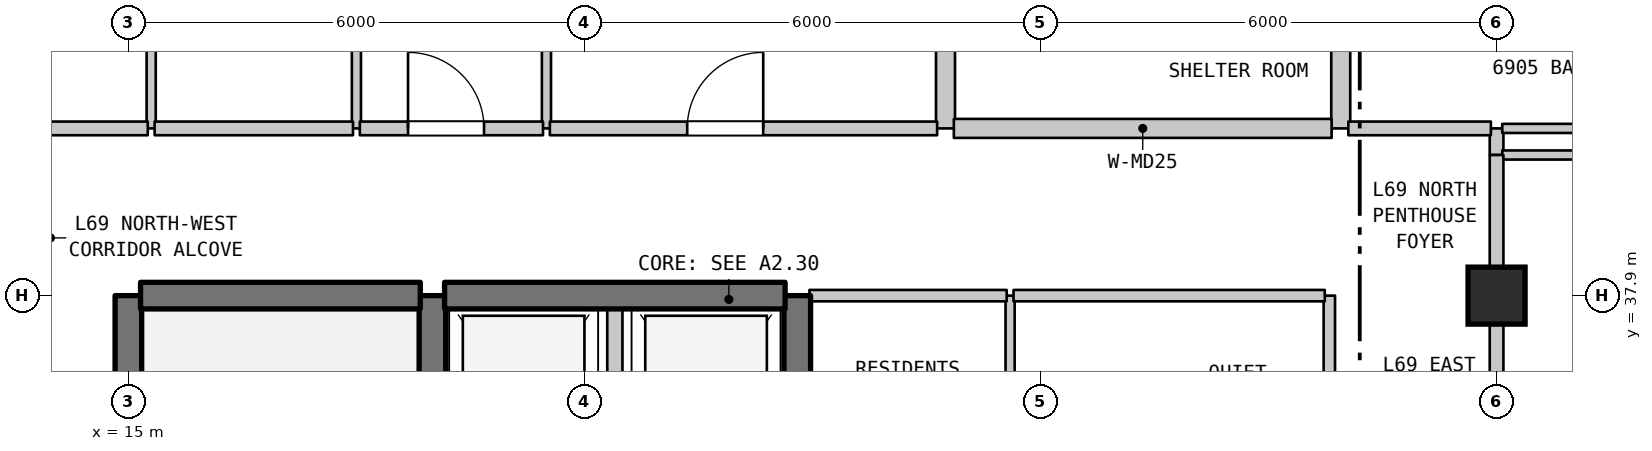
"""IFC4 building model, lengths in metres.
Left out: names, types, materials, properties, quantities, classifications, styles, units other than length and angle.
Written with IfcOpenShell. Run it as: python <this file> out.ifc"""

import sys

from ifc_helpers import new_model, si_unit, direction, frame, frame_2d, origin, origin_2d, place, context, subcontext, project, spatial, rectangle, extrude, element, fill, save


model = new_model("IFC4")
c1 = context("Model", 3, precision=1e-05, world=origin(), true_north=direction((0.0, 1.0)))
c2 = subcontext(c1, "Body", "Model", "MODEL_VIEW")
j1 = project(units=[si_unit("LENGTHUNIT", "METRE"), si_unit("PLANEANGLEUNIT", "RADIAN")], contexts=[c1])
p1 = place(None, origin())
s1 = spatial("IfcSite", under=j1, at=p1, CompositionType="ELEMENT")
p2 = place(p1, origin())
s2 = spatial("IfcBuilding", under=s1, at=p2, CompositionType="ELEMENT")
p3 = place(p2, frame((0.0, 0.0, 276.9)))
s3 = spatial("IfcBuildingStorey", under=s2, at=p3, CompositionType="ELEMENT", Elevation=276.9)
p4 = place(p3, frame((33.0, 37.9, 0.0), z_axis=(0.0, 0.0, 1.0), x_axis=(1.0, 0.0, 0.0)))
e1 = element("IfcColumn", 1, at=p4, inside=s3, PredefinedType="COLUMN", context=c2, shape_type="SweptSolid", body=[
    extrude(rectangle(XDim=0.75, YDim=0.75, at=origin_2d()), origin(), (0.0, 0.0, 1.0), 3.7),
])
p5 = place(p3, frame((15.0, 31.1, 0.0), z_axis=(0.0, 0.0, 1.0), x_axis=(0.0, 1.0, 0.0)))
e2 = element("IfcWall", 2, at=p5, inside=s3, PredefinedType="SHEAR", context=c2, shape_type="SweptSolid", body=[
    extrude(rectangle(XDim=6.8, YDim=0.35, at=frame_2d((3.4, 0.0))), origin(), (0.0, 0.0, 1.0), 3.39),
])
p6 = place(p3, frame((15.3, 40.1, 0.0), z_axis=(0.0, 0.0, 1.0), x_axis=(0.0, 1.0, 0.0)))
e3 = element("IfcWall", 3, at=p6, inside=s3, PredefinedType="PARTITIONING", context=c2, shape_type="SweptSolid", body=[
    extrude(rectangle(XDim=3.2, YDim=0.12, at=frame_2d((1.6, 0.0))), origin(), (0.0, 0.0, 1.0), 3.39),
])
p7 = place(p3, frame((18.0, 40.1, 0.0), z_axis=(0.0, 0.0, 1.0), x_axis=(0.0, 1.0, 0.0)))
e4 = element("IfcWall", 4, at=p7, inside=s3, PredefinedType="PARTITIONING", context=c2, shape_type="SweptSolid", body=[
    extrude(rectangle(XDim=3.2, YDim=0.12, at=frame_2d((1.6, 0.0))), origin(), (0.0, 0.0, 1.0), 3.39),
])
p8 = place(p7, frame((1.15, 0.0, 0.0)))
e5 = element("IfcOpeningElement", 5, at=p8, cuts=e4, PredefinedType="OPENING", context=c2, shape_type="SweptSolid", body=[
    extrude(rectangle(XDim=0.9, YDim=2.15, at=frame_2d((0.45, 1.075))), frame((0.0, 0.07, 0.0), z_axis=(0.0, -1.0, 0.0), x_axis=(1.0, 0.0, 0.0)), (0.0, 0.0, 1.0), 0.14),
])
p9 = place(p3, frame((19.0, 35.0, 0.0), z_axis=(0.0, 0.0, 1.0), x_axis=(0.0, 1.0, 0.0)))
e6 = element("IfcWall", 6, at=p9, inside=s3, PredefinedType="SHEAR", context=c2, shape_type="SweptSolid", body=[
    extrude(rectangle(XDim=2.9, YDim=0.35, at=frame_2d((1.45, 0.0))), origin(), (0.0, 0.0, 1.0), 3.39),
])
p10 = place(p3, frame((20.5, 40.1, 0.0), z_axis=(0.0, 0.0, 1.0), x_axis=(0.0, 1.0, 0.0)))
e7 = element("IfcWall", 7, at=p10, inside=s3, PredefinedType="PARTITIONING", context=c2, shape_type="SweptSolid", body=[
    extrude(rectangle(XDim=2.05, YDim=0.12, at=frame_2d((1.025, 0.0))), origin(), (0.0, 0.0, 1.0), 3.39),
])
p11 = place(p3, frame((21.4, 35.0, 0.0), z_axis=(0.0, 0.0, 1.0), x_axis=(0.0, 1.0, 0.0)))
e8 = element("IfcWall", 8, at=p11, inside=s3, PredefinedType="STANDARD", context=c2, shape_type="SweptSolid", body=[
    extrude(rectangle(XDim=2.9, YDim=0.2, at=frame_2d((1.45, 0.0))), origin(), (0.0, 0.0, 1.0), 3.39),
])
p12 = place(p3, frame((23.8, 35.0, 0.0), z_axis=(0.0, 0.0, 1.0), x_axis=(0.0, 1.0, 0.0)))
e9 = element("IfcWall", 9, at=p12, inside=s3, PredefinedType="SHEAR", context=c2, shape_type="SweptSolid", body=[
    extrude(rectangle(XDim=2.9, YDim=0.35, at=frame_2d((1.45, 0.0))), origin(), (0.0, 0.0, 1.0), 3.39),
])
p13 = place(p3, frame((25.75, 40.1, 0.0), z_axis=(0.0, 0.0, 1.0), x_axis=(0.0, 1.0, 0.0)))
e10 = element("IfcWall", 10, at=p13, inside=s3, PredefinedType="STANDARD", context=c2, shape_type="SweptSolid", body=[
    extrude(rectangle(XDim=2.3, YDim=0.25, at=frame_2d((1.15, 0.0))), origin(), (0.0, 0.0, 1.0), 3.39),
])
p14 = place(p3, frame((26.6, 35.0, 0.0), z_axis=(0.0, 0.0, 1.0), x_axis=(0.0, 1.0, 0.0)))
e11 = element("IfcWall", 11, at=p14, inside=s3, PredefinedType="PARTITIONING", context=c2, shape_type="SweptSolid", body=[
    extrude(rectangle(XDim=2.9, YDim=0.12, at=frame_2d((1.45, 0.0))), origin(), (0.0, 0.0, 1.0), 3.39),
])
p15 = place(p3, frame((30.8, 35.0, 0.0), z_axis=(0.0, 0.0, 1.0), x_axis=(0.0, 1.0, 0.0)))
e12 = element("IfcWall", 12, at=p15, inside=s3, PredefinedType="STANDARD", context=c2, shape_type="SweptSolid", body=[
    extrude(rectangle(XDim=2.9, YDim=0.15, at=frame_2d((1.45, 0.0))), origin(), (0.0, 0.0, 1.0), 3.39),
])
p16 = place(p3, frame((30.95, 40.1, 0.0), z_axis=(0.0, 0.0, 1.0), x_axis=(0.0, 1.0, 0.0)))
e13 = element("IfcWall", 13, at=p16, inside=s3, PredefinedType="STANDARD", context=c2, shape_type="SweptSolid", body=[
    extrude(rectangle(XDim=2.3, YDim=0.25, at=frame_2d((1.15, 0.0))), origin(), (0.0, 0.0, 1.0), 3.39),
])
p17 = place(p3, frame((33.0, 36.639, 0.0), z_axis=(0.0, 0.0, 1.0), x_axis=(0.0, 1.0, 0.0)))
e14 = element("IfcWall", 14, at=p17, inside=s3, PredefinedType="STANDARD", context=c2, shape_type="SweptSolid", body=[
    extrude(rectangle(XDim=1.261, YDim=0.18, at=frame_2d((0.63, 0.0))), origin(), (0.0, 0.0, 1.0), 2.89),
])
p18 = place(p3, frame((33.0, 39.75, 0.0), z_axis=(0.0, 0.0, 1.0), x_axis=(0.0, 1.0, 0.0)))
e15 = element("IfcWall", 15, at=p18, inside=s3, PredefinedType="STANDARD", context=c2, shape_type="SweptSolid", body=[
    extrude(rectangle(XDim=0.35, YDim=0.18, at=frame_2d((0.175, 0.0))), origin(), (0.0, 0.0, 1.0), 3.39),
])
p19 = place(p3, frame((15.16, 37.9, 0.0), z_axis=(0.0, 0.0, 1.0), x_axis=(1.0, 0.0, 0.0)))
e16 = element("IfcWall", 16, at=p19, inside=s3, PredefinedType="SHEAR", context=c2, shape_type="SweptSolid", body=[
    extrude(rectangle(XDim=3.68, YDim=0.35, at=frame_2d((1.84, 0.0))), origin(), (0.0, 0.0, 1.0), 3.39),
])
p20 = place(p3, frame((19.16, 37.9, 0.0), z_axis=(0.0, 0.0, 1.0), x_axis=(1.0, 0.0, 0.0)))
e17 = element("IfcWall", 17, at=p20, inside=s3, PredefinedType="SHEAR", context=c2, shape_type="SweptSolid", body=[
    extrude(rectangle(XDim=4.48, YDim=0.35, at=frame_2d((2.24, 0.0))), origin(), (0.0, 0.0, 1.0), 3.39),
])
p21 = place(p3, frame((23.96, 37.9, 0.0), z_axis=(0.0, 0.0, 1.0), x_axis=(1.0, 0.0, 0.0)))
e18 = element("IfcWall", 18, at=p21, inside=s3, PredefinedType="STANDARD", context=c2, shape_type="SweptSolid", body=[
    extrude(rectangle(XDim=2.595, YDim=0.15, at=frame_2d((1.297, 0.0))), origin(), (0.0, 0.0, 1.0), 2.89),
])
p22 = place(p3, frame((26.645, 37.9, 0.0), z_axis=(0.0, 0.0, 1.0), x_axis=(1.0, 0.0, 0.0)))
e19 = element("IfcWall", 19, at=p22, inside=s3, PredefinedType="STANDARD", context=c2, shape_type="SweptSolid", body=[
    extrude(rectangle(XDim=4.095, YDim=0.15, at=frame_2d((2.047, 0.0))), origin(), (0.0, 0.0, 1.0), 2.89),
])
p23 = place(p3, frame((33.075, 39.75, 0.0), z_axis=(0.0, 0.0, 1.0), x_axis=(1.0, 0.0, 0.0)))
e20 = element("IfcWall", 20, at=p23, inside=s3, PredefinedType="PARTITIONING", context=c2, shape_type="SweptSolid", body=[
    extrude(rectangle(XDim=4.46, YDim=0.12, at=frame_2d((2.23, 0.0))), origin(), (0.0, 0.0, 1.0), 3.39),
])
p24 = place(p3, frame((12.975, 40.1, 0.0), z_axis=(0.0, 0.0, 1.0), x_axis=(1.0, 0.0, 0.0)))
e21 = element("IfcWall", 21, at=p24, inside=s3, PredefinedType="STANDARD", context=c2, shape_type="SweptSolid", body=[
    extrude(rectangle(XDim=2.28, YDim=0.18, at=frame_2d((1.14, 0.0))), origin(), (0.0, 0.0, 1.0), 3.39),
])
p25 = place(p3, frame((15.345, 40.1, 0.0), z_axis=(0.0, 0.0, 1.0), x_axis=(1.0, 0.0, 0.0)))
e22 = element("IfcWall", 22, at=p25, inside=s3, PredefinedType="STANDARD", context=c2, shape_type="SweptSolid", body=[
    extrude(rectangle(XDim=2.61, YDim=0.18, at=frame_2d((1.305, 0.0))), origin(), (0.0, 0.0, 1.0), 3.39),
])
p26 = place(p3, frame((18.045, 40.1, 0.0), z_axis=(0.0, 0.0, 1.0), x_axis=(1.0, 0.0, 0.0)))
e23 = element("IfcWall", 23, at=p26, inside=s3, PredefinedType="STANDARD", context=c2, shape_type="SweptSolid", body=[
    extrude(rectangle(XDim=2.41, YDim=0.18, at=frame_2d((1.205, 0.0))), origin(), (0.0, 0.0, 1.0), 3.39),
])
p27 = place(p26, frame((0.634, 0.0, 0.0)))
e24 = element("IfcOpeningElement", 24, at=p27, cuts=e23, PredefinedType="OPENING", context=c2, shape_type="SweptSolid", body=[
    extrude(rectangle(XDim=1.0, YDim=2.15, at=frame_2d((0.5, 1.075))), frame((0.0, 0.1, 0.0), z_axis=(0.0, -1.0, 0.0), x_axis=(1.0, 0.0, 0.0)), (0.0, 0.0, 1.0), 0.2),
])
p28 = place(p3, frame((20.545, 40.1, 0.0), z_axis=(0.0, 0.0, 1.0), x_axis=(1.0, 0.0, 0.0)))
e25 = element("IfcWall", 25, at=p28, inside=s3, PredefinedType="STANDARD", context=c2, shape_type="SweptSolid", body=[
    extrude(rectangle(XDim=5.095, YDim=0.18, at=frame_2d((2.547, 0.0))), origin(), (0.0, 0.0, 1.0), 3.39),
])
p29 = place(p28, frame((1.807, 0.0, 0.0)))
e26 = element("IfcOpeningElement", 26, at=p29, cuts=e25, PredefinedType="OPENING", context=c2, shape_type="SweptSolid", body=[
    extrude(rectangle(XDim=1.0, YDim=2.15, at=frame_2d((0.5, 1.075))), frame((0.0, 0.1, 0.0), z_axis=(0.0, -1.0, 0.0), x_axis=(1.0, 0.0, 0.0)), (0.0, 0.0, 1.0), 0.2),
])
p30 = place(p3, frame((25.86, 40.1, 0.0), z_axis=(0.0, 0.0, 1.0), x_axis=(1.0, 0.0, 0.0)))
e27 = element("IfcWall", 27, at=p30, inside=s3, PredefinedType="STANDARD", context=c2, shape_type="SweptSolid", body=[
    extrude(rectangle(XDim=4.97, YDim=0.25, at=frame_2d((2.485, 0.0))), origin(), (0.0, 0.0, 1.0), 3.39),
])
p31 = place(p3, frame((31.05, 40.1, 0.0), z_axis=(0.0, 0.0, 1.0), x_axis=(1.0, 0.0, 0.0)))
e28 = element("IfcWall", 28, at=p31, inside=s3, PredefinedType="STANDARD", context=c2, shape_type="SweptSolid", body=[
    extrude(rectangle(XDim=1.875, YDim=0.18, at=frame_2d((0.938, 0.0))), origin(), (0.0, 0.0, 1.0), 3.39),
])
p32 = place(p3, frame((33.075, 40.1, 0.0), z_axis=(0.0, 0.0, 1.0), x_axis=(1.0, 0.0, 0.0)))
e29 = element("IfcWall", 29, at=p32, inside=s3, PredefinedType="PARTITIONING", context=c2, shape_type="SweptSolid", body=[
    extrude(rectangle(XDim=2.02, YDim=0.12, at=frame_2d((1.01, 0.0))), origin(), (0.0, 0.0, 1.0), 3.39),
])
p33 = place(p3, frame((33.0, 37.9, 0.0), z_axis=(0.0, 0.0, 1.0), x_axis=(0.0, 1.0, 0.0)))
e30 = element("IfcWall", 30, at=p33, inside=s3, PredefinedType="STANDARD", context=c2, shape_type="SweptSolid", body=[
    extrude(rectangle(XDim=1.85, YDim=0.18, at=frame_2d((0.925, 0.0))), origin(), (0.0, 0.0, 1.0), 2.79),
])
p34 = place(p27, origin())
e31 = element("IfcDoor", 31, at=p34, inside=s3, OperationType="SINGLE_SWING_LEFT", PredefinedType="DOOR", context=c2, shape_type="SweptSolid", body=[
    extrude(rectangle(XDim=1.0, YDim=2.15, at=frame_2d((0.5, 1.075))), frame((0.0, 0.025, 0.0), z_axis=(0.0, -1.0, 0.0), x_axis=(1.0, 0.0, 0.0)), (0.0, 0.0, 1.0), 0.05),
])
fill(e24, e31)
p35 = place(p29, origin())
e32 = element("IfcDoor", 32, at=p35, inside=s3, OperationType="SINGLE_SWING_RIGHT", PredefinedType="DOOR", context=c2, shape_type="SweptSolid", body=[
    extrude(rectangle(XDim=1.0, YDim=2.15, at=frame_2d((0.5, 1.075))), frame((0.0, 0.025, 0.0), z_axis=(0.0, -1.0, 0.0), x_axis=(1.0, 0.0, 0.0)), (0.0, 0.0, 1.0), 0.05),
])
fill(e26, e32)
save(model, sys.argv[1])
